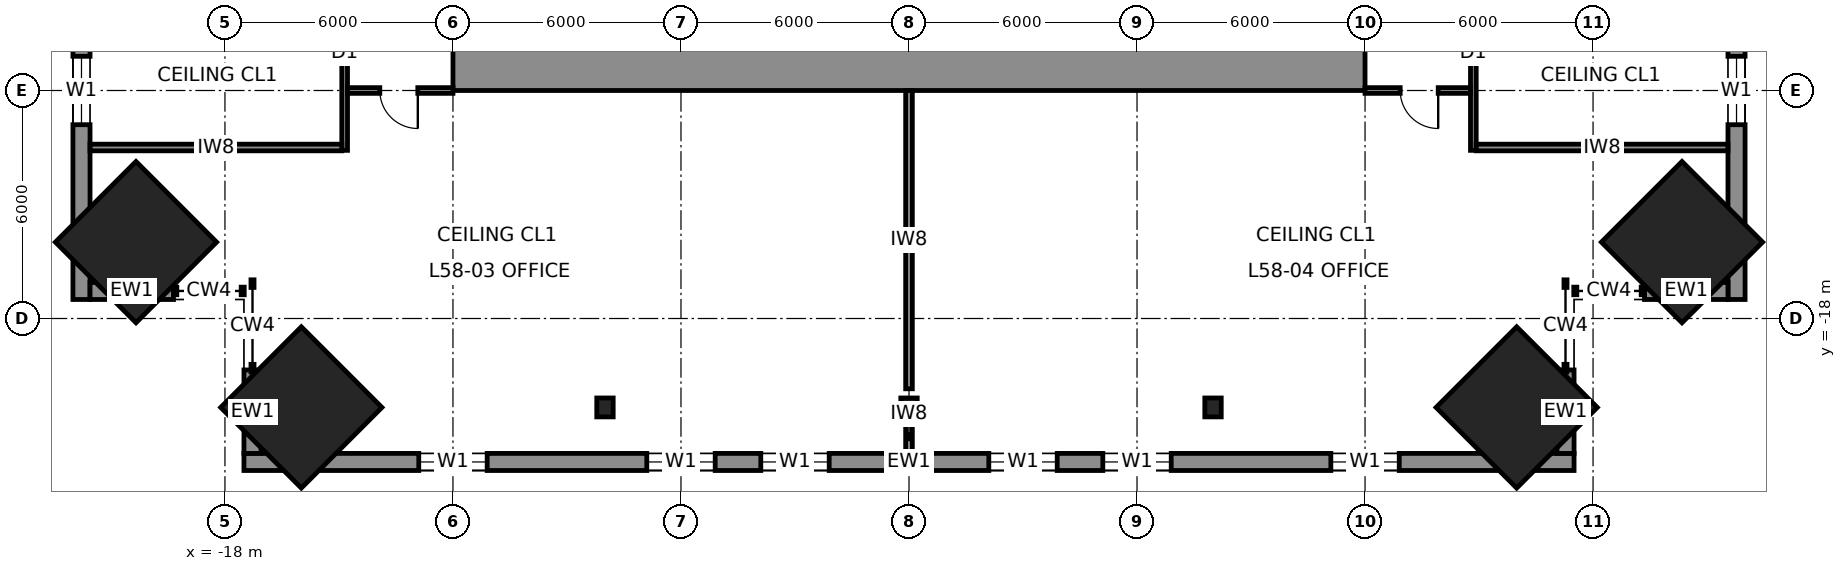
"""IFC4 building model, lengths in metres.
Left out: names, types, materials, properties, quantities, classifications, styles, units other than length and angle.
Written with IfcOpenShell. Run it as: python <this file> out.ifc"""

import sys

from ifc_helpers import new_model, si_unit, direction, frame, frame_2d, origin, origin_2d, place, context, subcontext, project, spatial, rectangle, i_section, extrude, element, fill, save


model = new_model("IFC4")
c1 = context("Model", 3, precision=1e-05, world=origin(), true_north=direction((0.0, 1.0)))
c2 = subcontext(c1, "Body", "Model", "MODEL_VIEW")
j1 = project(units=[si_unit("LENGTHUNIT", "METRE"), si_unit("PLANEANGLEUNIT", "RADIAN")], contexts=[c1])
p1 = place(None, origin())
s1 = spatial("IfcSite", under=j1, at=p1, CompositionType="ELEMENT")
p2 = place(p1, origin())
s2 = spatial("IfcBuilding", under=s1, at=p2, CompositionType="ELEMENT")
p3 = place(p2, frame((0.0, 0.0, 261.8)))
s3 = spatial("IfcBuildingStorey", under=s2, at=p3, CompositionType="ELEMENT", Elevation=261.8)
for number, where, z_axis, x_axis in (
    (1, (20.34, -15.99, 0.0), (-0.04, 0.04, 0.998), (-0.707, -0.708, 0.0)),
    (2, (15.99, -20.34, 0.0), (-0.04, 0.04, 0.998), (-0.708, -0.707, 0.0)),
    (3, (-15.99, -20.34, 0.0), (0.04, 0.04, 0.998), (-0.708, 0.707, 0.0)),
    (4, (-20.34, -15.99, 0.0), (0.04, 0.04, 0.998), (-0.707, 0.708, 0.0)),
):
    element("IfcColumn", number, at=place(p3, frame(where, z_axis=z_axis, x_axis=x_axis)), inside=s3, PredefinedType="COLUMN", context=c2, shape_type="SweptSolid", body=[
        extrude(rectangle(XDim=3.0, YDim=3.0, at=origin_2d()), origin(), (0.0, 0.0, 1.0), 4.007),
    ])
for number, where, z_axis, x_axis in (
    (5, (0.0, -20.34, 0.0), (0.0, 0.04, 0.999), (-1.0, 0.0, 0.0)),
    (6, (-8.0, -20.34, 0.0), (0.0, 0.04, 0.999), (-1.0, 0.0, 0.0)),
    (7, (8.0, -20.34, 0.0), (0.0, 0.04, 0.999), (-1.0, 0.0, 0.0)),
):
    element("IfcColumn", number, at=place(p3, frame(where, z_axis=z_axis, x_axis=x_axis)), inside=s3, PredefinedType="COLUMN", context=c2, shape_type="SweptSolid", body=[
        extrude(i_section(OverallWidth=0.432, OverallDepth=0.498, WebThickness=0.056, FlangeThickness=0.089, at=origin_2d()), origin(), (0.0, 0.0, 1.0), 4.003),
    ])
p4 = place(p3, frame((12.0, -11.25, 0.0), z_axis=(0.0, 0.0, 1.0), x_axis=(-1.0, 0.0, 0.0)))
e8 = element("IfcWall", 8, at=p4, inside=s3, PredefinedType="SHEAR", context=c2, shape_type="SweptSolid", body=[
    extrude(rectangle(XDim=24.0, YDim=1.5, at=frame_2d((12.0, 0.0))), origin(), (0.0, 0.0, 1.0), 4.0),
])
p5 = place(p3, frame((21.775, -17.5, 0.0), z_axis=(0.0, 0.0, 1.0), x_axis=(0.0, 1.0, 0.0)))
e9 = element("IfcWall", 9, at=p5, inside=s3, PredefinedType="SOLIDWALL", context=c2, shape_type="SweptSolid", body=[
    extrude(rectangle(XDim=35.0, YDim=0.45, at=frame_2d((17.5, 0.0))), origin(), (0.0, 0.0, 1.0), 3.83),
])
p6 = place(p5, frame((4.6, 0.0, 0.7)))
e10 = element("IfcOpeningElement", 10, at=p6, cuts=e9, PredefinedType="OPENING", context=c2, shape_type="SweptSolid", body=[
    extrude(rectangle(XDim=1.8, YDim=2.6, at=frame_2d((0.9, 1.3))), frame((0.0, 0.235, 0.0), z_axis=(0.0, -1.0, 0.0), x_axis=(1.0, 0.0, 0.0)), (0.0, 0.0, 1.0), 0.47),
])
p7 = place(p5, frame((10.6, 0.0, 0.7)))
e11 = element("IfcOpeningElement", 11, at=p7, cuts=e9, PredefinedType="OPENING", context=c2, shape_type="SweptSolid", body=[
    extrude(rectangle(XDim=1.8, YDim=2.6, at=frame_2d((0.9, 1.3))), frame((0.0, 0.235, 0.0), z_axis=(0.0, -1.0, 0.0), x_axis=(1.0, 0.0, 0.0)), (0.0, 0.0, 1.0), 0.47),
])
p8 = place(p5, frame((13.6, 0.0, 0.7)))
e12 = element("IfcOpeningElement", 12, at=p8, cuts=e9, PredefinedType="OPENING", context=c2, shape_type="SweptSolid", body=[
    extrude(rectangle(XDim=1.8, YDim=2.6, at=frame_2d((0.9, 1.3))), frame((0.0, 0.235, 0.0), z_axis=(0.0, -1.0, 0.0), x_axis=(1.0, 0.0, 0.0)), (0.0, 0.0, 1.0), 0.47),
])
p9 = place(p5, frame((19.6, 0.0, 0.7)))
e13 = element("IfcOpeningElement", 13, at=p9, cuts=e9, PredefinedType="OPENING", context=c2, shape_type="SweptSolid", body=[
    extrude(rectangle(XDim=1.8, YDim=2.6, at=frame_2d((0.9, 1.3))), frame((0.0, 0.235, 0.0), z_axis=(0.0, -1.0, 0.0), x_axis=(1.0, 0.0, 0.0)), (0.0, 0.0, 1.0), 0.47),
])
p10 = place(p5, frame((22.6, 0.0, 0.7)))
e14 = element("IfcOpeningElement", 14, at=p10, cuts=e9, PredefinedType="OPENING", context=c2, shape_type="SweptSolid", body=[
    extrude(rectangle(XDim=1.8, YDim=2.6, at=frame_2d((0.9, 1.3))), frame((0.0, 0.235, 0.0), z_axis=(0.0, -1.0, 0.0), x_axis=(1.0, 0.0, 0.0)), (0.0, 0.0, 1.0), 0.47),
])
p11 = place(p5, frame((28.6, 0.0, 0.7)))
e15 = element("IfcOpeningElement", 15, at=p11, cuts=e9, PredefinedType="OPENING", context=c2, shape_type="SweptSolid", body=[
    extrude(rectangle(XDim=1.8, YDim=2.6, at=frame_2d((0.9, 1.3))), frame((0.0, 0.235, 0.0), z_axis=(0.0, -1.0, 0.0), x_axis=(1.0, 0.0, 0.0)), (0.0, 0.0, 1.0), 0.47),
])
p12 = place(p3, frame((-17.5, -21.775, 0.0), z_axis=(0.0, 0.0, 1.0), x_axis=(1.0, 0.0, 0.0)))
e16 = element("IfcWall", 16, at=p12, inside=s3, PredefinedType="SOLIDWALL", context=c2, shape_type="SweptSolid", body=[
    extrude(rectangle(XDim=35.0, YDim=0.45, at=frame_2d((17.5, 0.0))), origin(), (0.0, 0.0, 1.0), 3.83),
])
p13 = place(p12, frame((4.6, 0.0, 0.7)))
e17 = element("IfcOpeningElement", 17, at=p13, cuts=e16, PredefinedType="OPENING", context=c2, shape_type="SweptSolid", body=[
    extrude(rectangle(XDim=1.8, YDim=2.6, at=frame_2d((0.9, 1.3))), frame((0.0, 0.235, 0.0), z_axis=(0.0, -1.0, 0.0), x_axis=(1.0, 0.0, 0.0)), (0.0, 0.0, 1.0), 0.47),
])
p14 = place(p12, frame((10.6, 0.0, 0.7)))
e18 = element("IfcOpeningElement", 18, at=p14, cuts=e16, PredefinedType="OPENING", context=c2, shape_type="SweptSolid", body=[
    extrude(rectangle(XDim=1.8, YDim=2.6, at=frame_2d((0.9, 1.3))), frame((0.0, 0.235, 0.0), z_axis=(0.0, -1.0, 0.0), x_axis=(1.0, 0.0, 0.0)), (0.0, 0.0, 1.0), 0.47),
])
p15 = place(p12, frame((13.6, 0.0, 0.7)))
e19 = element("IfcOpeningElement", 19, at=p15, cuts=e16, PredefinedType="OPENING", context=c2, shape_type="SweptSolid", body=[
    extrude(rectangle(XDim=1.8, YDim=2.6, at=frame_2d((0.9, 1.3))), frame((0.0, 0.235, 0.0), z_axis=(0.0, -1.0, 0.0), x_axis=(1.0, 0.0, 0.0)), (0.0, 0.0, 1.0), 0.47),
])
p16 = place(p12, frame((19.6, 0.0, 0.7)))
e20 = element("IfcOpeningElement", 20, at=p16, cuts=e16, PredefinedType="OPENING", context=c2, shape_type="SweptSolid", body=[
    extrude(rectangle(XDim=1.8, YDim=2.6, at=frame_2d((0.9, 1.3))), frame((0.0, 0.235, 0.0), z_axis=(0.0, -1.0, 0.0), x_axis=(1.0, 0.0, 0.0)), (0.0, 0.0, 1.0), 0.47),
])
p17 = place(p12, frame((22.6, 0.0, 0.7)))
e21 = element("IfcOpeningElement", 21, at=p17, cuts=e16, PredefinedType="OPENING", context=c2, shape_type="SweptSolid", body=[
    extrude(rectangle(XDim=1.8, YDim=2.6, at=frame_2d((0.9, 1.3))), frame((0.0, 0.235, 0.0), z_axis=(0.0, -1.0, 0.0), x_axis=(1.0, 0.0, 0.0)), (0.0, 0.0, 1.0), 0.47),
])
p18 = place(p12, frame((28.6, 0.0, 0.7)))
e22 = element("IfcOpeningElement", 22, at=p18, cuts=e16, PredefinedType="OPENING", context=c2, shape_type="SweptSolid", body=[
    extrude(rectangle(XDim=1.8, YDim=2.6, at=frame_2d((0.9, 1.3))), frame((0.0, 0.235, 0.0), z_axis=(0.0, -1.0, 0.0), x_axis=(1.0, 0.0, 0.0)), (0.0, 0.0, 1.0), 0.47),
])
p19 = place(p3, frame((-21.775, 17.5, 0.0), z_axis=(0.0, 0.0, 1.0), x_axis=(0.0, -1.0, 0.0)))
e23 = element("IfcWall", 23, at=p19, inside=s3, PredefinedType="SOLIDWALL", context=c2, shape_type="SweptSolid", body=[
    extrude(rectangle(XDim=35.0, YDim=0.45, at=frame_2d((17.5, 0.0))), origin(), (0.0, 0.0, 1.0), 3.83),
])
p20 = place(p19, frame((4.6, 0.0, 0.7)))
e24 = element("IfcOpeningElement", 24, at=p20, cuts=e23, PredefinedType="OPENING", context=c2, shape_type="SweptSolid", body=[
    extrude(rectangle(XDim=1.8, YDim=2.6, at=frame_2d((0.9, 1.3))), frame((0.0, 0.235, 0.0), z_axis=(0.0, -1.0, 0.0), x_axis=(1.0, 0.0, 0.0)), (0.0, 0.0, 1.0), 0.47),
])
p21 = place(p19, frame((10.6, 0.0, 0.7)))
e25 = element("IfcOpeningElement", 25, at=p21, cuts=e23, PredefinedType="OPENING", context=c2, shape_type="SweptSolid", body=[
    extrude(rectangle(XDim=1.8, YDim=2.6, at=frame_2d((0.9, 1.3))), frame((0.0, 0.235, 0.0), z_axis=(0.0, -1.0, 0.0), x_axis=(1.0, 0.0, 0.0)), (0.0, 0.0, 1.0), 0.47),
])
p22 = place(p19, frame((13.6, 0.0, 0.7)))
e26 = element("IfcOpeningElement", 26, at=p22, cuts=e23, PredefinedType="OPENING", context=c2, shape_type="SweptSolid", body=[
    extrude(rectangle(XDim=1.8, YDim=2.6, at=frame_2d((0.9, 1.3))), frame((0.0, 0.235, 0.0), z_axis=(0.0, -1.0, 0.0), x_axis=(1.0, 0.0, 0.0)), (0.0, 0.0, 1.0), 0.47),
])
p23 = place(p19, frame((19.6, 0.0, 0.7)))
e27 = element("IfcOpeningElement", 27, at=p23, cuts=e23, PredefinedType="OPENING", context=c2, shape_type="SweptSolid", body=[
    extrude(rectangle(XDim=1.8, YDim=2.6, at=frame_2d((0.9, 1.3))), frame((0.0, 0.235, 0.0), z_axis=(0.0, -1.0, 0.0), x_axis=(1.0, 0.0, 0.0)), (0.0, 0.0, 1.0), 0.47),
])
p24 = place(p19, frame((22.6, 0.0, 0.7)))
e28 = element("IfcOpeningElement", 28, at=p24, cuts=e23, PredefinedType="OPENING", context=c2, shape_type="SweptSolid", body=[
    extrude(rectangle(XDim=1.8, YDim=2.6, at=frame_2d((0.9, 1.3))), frame((0.0, 0.235, 0.0), z_axis=(0.0, -1.0, 0.0), x_axis=(1.0, 0.0, 0.0)), (0.0, 0.0, 1.0), 0.47),
])
p25 = place(p19, frame((28.6, 0.0, 0.7)))
e29 = element("IfcOpeningElement", 29, at=p25, cuts=e23, PredefinedType="OPENING", context=c2, shape_type="SweptSolid", body=[
    extrude(rectangle(XDim=1.8, YDim=2.6, at=frame_2d((0.9, 1.3))), frame((0.0, 0.235, 0.0), z_axis=(0.0, -1.0, 0.0), x_axis=(1.0, 0.0, 0.0)), (0.0, 0.0, 1.0), 0.47),
])
for number, where, z_axis, x_axis in (
    (30, (17.275, -19.354, 0.0), (0.0, 0.0, 1.0), (0.0, -1.0, 0.0)),
    (31, (19.354, -17.275, 0.0), (0.0, 0.0, 1.0), (1.0, 0.0, 0.0)),
    (32, (-17.275, -19.354, 0.0), (0.0, 0.0, 1.0), (0.0, -1.0, 0.0)),
    (33, (-19.354, -17.275, 0.0), (0.0, 0.0, 1.0), (-1.0, 0.0, 0.0)),
):
    element("IfcWall", number, at=place(p3, frame(where, z_axis=z_axis, x_axis=x_axis)), inside=s3, PredefinedType="SOLIDWALL", context=c2, shape_type="SweptSolid", body=[
        extrude(rectangle(XDim=2.196, YDim=0.45, at=frame_2d((1.098, 0.0))), origin(), (0.0, 0.0, 1.0), 3.83),
    ])
p26 = place(p3, frame((14.85, -13.575, 0.0), z_axis=(0.0, 0.0, 1.0), x_axis=(0.0, 1.0, 0.0)))
e34 = element("IfcWall", 34, at=p26, inside=s3, PredefinedType="PARTITIONING", context=c2, shape_type="SweptSolid", body=[
    extrude(rectangle(XDim=27.15, YDim=0.15, at=frame_2d((13.575, 0.0))), origin(), (0.0, 0.0, 1.0), 3.83),
])
p27 = place(p26, frame((3.175, 0.0, 0.0)))
e35 = element("IfcOpeningElement", 35, at=p27, cuts=e34, PredefinedType="OPENING", context=c2, shape_type="SweptSolid", body=[
    extrude(rectangle(XDim=1.0, YDim=2.3, at=frame_2d((0.5, 1.15))), frame((0.0, 0.085, 0.0), z_axis=(0.0, -1.0, 0.0), x_axis=(1.0, 0.0, 0.0)), (0.0, 0.0, 1.0), 0.17),
])
p28 = place(p26, frame((6.625, 0.0, 0.0)))
e36 = element("IfcOpeningElement", 36, at=p28, cuts=e34, PredefinedType="OPENING", context=c2, shape_type="SweptSolid", body=[
    extrude(rectangle(XDim=1.0, YDim=2.3, at=frame_2d((0.5, 1.15))), frame((0.0, 0.085, 0.0), z_axis=(0.0, -1.0, 0.0), x_axis=(1.0, 0.0, 0.0)), (0.0, 0.0, 1.0), 0.17),
])
p29 = place(p26, frame((19.775, 0.0, 0.0)))
e37 = element("IfcOpeningElement", 37, at=p29, cuts=e34, PredefinedType="OPENING", context=c2, shape_type="SweptSolid", body=[
    extrude(rectangle(XDim=1.0, YDim=2.3, at=frame_2d((0.5, 1.15))), frame((0.0, 0.085, 0.0), z_axis=(0.0, -1.0, 0.0), x_axis=(1.0, 0.0, 0.0)), (0.0, 0.0, 1.0), 0.17),
])
p30 = place(p26, frame((22.975, 0.0, 0.0)))
e38 = element("IfcOpeningElement", 38, at=p30, cuts=e34, PredefinedType="OPENING", context=c2, shape_type="SweptSolid", body=[
    extrude(rectangle(XDim=1.0, YDim=2.3, at=frame_2d((0.5, 1.15))), frame((0.0, 0.085, 0.0), z_axis=(0.0, -1.0, 0.0), x_axis=(1.0, 0.0, 0.0)), (0.0, 0.0, 1.0), 0.17),
])
p31 = place(p26, frame((16.825, 0.0, 0.0)))
e39 = element("IfcOpeningElement", 39, at=p31, cuts=e34, PredefinedType="OPENING", context=c2, shape_type="SweptSolid", body=[
    extrude(rectangle(XDim=1.0, YDim=2.3, at=frame_2d((0.5, 1.15))), frame((0.0, 0.085, 0.0), z_axis=(0.0, -1.0, 0.0), x_axis=(1.0, 0.0, 0.0)), (0.0, 0.0, 1.0), 0.17),
])
p32 = place(p26, frame((9.575, 0.0, 0.0)))
e40 = element("IfcOpeningElement", 40, at=p32, cuts=e34, PredefinedType="OPENING", context=c2, shape_type="SweptSolid", body=[
    extrude(rectangle(XDim=1.0, YDim=2.3, at=frame_2d((0.5, 1.15))), frame((0.0, 0.085, 0.0), z_axis=(0.0, -1.0, 0.0), x_axis=(1.0, 0.0, 0.0)), (0.0, 0.0, 1.0), 0.17),
])
p33 = place(p3, frame((-14.85, 13.575, 0.0), z_axis=(0.0, 0.0, 1.0), x_axis=(0.0, -1.0, 0.0)))
e41 = element("IfcWall", 41, at=p33, inside=s3, PredefinedType="PARTITIONING", context=c2, shape_type="SweptSolid", body=[
    extrude(rectangle(XDim=27.15, YDim=0.15, at=frame_2d((13.575, 0.0))), origin(), (0.0, 0.0, 1.0), 3.83),
])
p34 = place(p33, frame((22.975, 0.0, 0.0)))
e42 = element("IfcOpeningElement", 42, at=p34, cuts=e41, PredefinedType="OPENING", context=c2, shape_type="SweptSolid", body=[
    extrude(rectangle(XDim=1.0, YDim=2.3, at=frame_2d((0.5, 1.15))), frame((0.0, 0.085, 0.0), z_axis=(0.0, -1.0, 0.0), x_axis=(1.0, 0.0, 0.0)), (0.0, 0.0, 1.0), 0.17),
])
p35 = place(p33, frame((19.525, 0.0, 0.0)))
e43 = element("IfcOpeningElement", 43, at=p35, cuts=e41, PredefinedType="OPENING", context=c2, shape_type="SweptSolid", body=[
    extrude(rectangle(XDim=1.0, YDim=2.3, at=frame_2d((0.5, 1.15))), frame((0.0, 0.085, 0.0), z_axis=(0.0, -1.0, 0.0), x_axis=(1.0, 0.0, 0.0)), (0.0, 0.0, 1.0), 0.17),
])
p36 = place(p33, frame((6.375, 0.0, 0.0)))
e44 = element("IfcOpeningElement", 44, at=p36, cuts=e41, PredefinedType="OPENING", context=c2, shape_type="SweptSolid", body=[
    extrude(rectangle(XDim=1.0, YDim=2.3, at=frame_2d((0.5, 1.15))), frame((0.0, 0.085, 0.0), z_axis=(0.0, -1.0, 0.0), x_axis=(1.0, 0.0, 0.0)), (0.0, 0.0, 1.0), 0.17),
])
p37 = place(p33, frame((3.175, 0.0, 0.0)))
e45 = element("IfcOpeningElement", 45, at=p37, cuts=e41, PredefinedType="OPENING", context=c2, shape_type="SweptSolid", body=[
    extrude(rectangle(XDim=1.0, YDim=2.3, at=frame_2d((0.5, 1.15))), frame((0.0, 0.085, 0.0), z_axis=(0.0, -1.0, 0.0), x_axis=(1.0, 0.0, 0.0)), (0.0, 0.0, 1.0), 0.17),
])
p38 = place(p33, frame((9.575, 0.0, 0.0)))
e46 = element("IfcOpeningElement", 46, at=p38, cuts=e41, PredefinedType="OPENING", context=c2, shape_type="SweptSolid", body=[
    extrude(rectangle(XDim=1.0, YDim=2.3, at=frame_2d((0.5, 1.15))), frame((0.0, 0.085, 0.0), z_axis=(0.0, -1.0, 0.0), x_axis=(1.0, 0.0, 0.0)), (0.0, 0.0, 1.0), 0.17),
])
p39 = place(p33, frame((16.575, 0.0, 0.0)))
e47 = element("IfcOpeningElement", 47, at=p39, cuts=e41, PredefinedType="OPENING", context=c2, shape_type="SweptSolid", body=[
    extrude(rectangle(XDim=1.0, YDim=2.3, at=frame_2d((0.5, 1.15))), frame((0.0, 0.085, 0.0), z_axis=(0.0, -1.0, 0.0), x_axis=(1.0, 0.0, 0.0)), (0.0, 0.0, 1.0), 0.17),
])
p40 = place(p3, frame((14.775, -12.0, 0.0), z_axis=(0.0, 0.0, 1.0), x_axis=(-1.0, 0.0, 0.0)))
e48 = element("IfcWall", 48, at=p40, inside=s3, PredefinedType="PARTITIONING", context=c2, shape_type="SweptSolid", body=[
    extrude(rectangle(XDim=2.775, YDim=0.15, at=frame_2d((1.387, 0.0))), origin(), (0.0, 0.0, 1.0), 3.83),
])
p41 = place(p40, frame((0.85, 0.0, 0.0)))
e49 = element("IfcOpeningElement", 49, at=p41, cuts=e48, PredefinedType="OPENING", context=c2, shape_type="SweptSolid", body=[
    extrude(rectangle(XDim=1.0, YDim=2.3, at=frame_2d((0.5, 1.15))), frame((0.0, 0.085, 0.0), z_axis=(0.0, -1.0, 0.0), x_axis=(1.0, 0.0, 0.0)), (0.0, 0.0, 1.0), 0.17),
])
p42 = place(p3, frame((-12.0, -12.0, 0.0), z_axis=(0.0, 0.0, 1.0), x_axis=(-1.0, 0.0, 0.0)))
e50 = element("IfcWall", 50, at=p42, inside=s3, PredefinedType="PARTITIONING", context=c2, shape_type="SweptSolid", body=[
    extrude(rectangle(XDim=2.775, YDim=0.15, at=frame_2d((1.387, 0.0))), origin(), (0.0, 0.0, 1.0), 3.83),
])
p43 = place(p42, frame((0.925, 0.0, 0.0)))
e51 = element("IfcOpeningElement", 51, at=p43, cuts=e50, PredefinedType="OPENING", context=c2, shape_type="SweptSolid", body=[
    extrude(rectangle(XDim=1.0, YDim=2.3, at=frame_2d((0.5, 1.15))), frame((0.0, 0.085, 0.0), z_axis=(0.0, -1.0, 0.0), x_axis=(1.0, 0.0, 0.0)), (0.0, 0.0, 1.0), 0.17),
])
for number, where, z_axis, x_axis in (
    (52, (21.55, -13.5, 0.0), (0.0, 0.0, 1.0), (-1.0, 0.0, 0.0)),
    (53, (-14.925, -13.5, 0.0), (0.0, 0.0, 1.0), (-1.0, 0.0, 0.0)),
):
    element("IfcWall", number, at=place(p3, frame(where, z_axis=z_axis, x_axis=x_axis)), inside=s3, PredefinedType="PARTITIONING", context=c2, shape_type="SweptSolid", body=[
        extrude(rectangle(XDim=6.625, YDim=0.175, at=frame_2d((3.312, 0.0))), origin(), (0.0, 0.0, 1.0), 3.83),
    ])
p44 = place(p3, frame((0.0, -12.0, 0.0), z_axis=(0.0, 0.0, 1.0), x_axis=(0.0, -1.0, 0.0)))
e54 = element("IfcWall", 54, at=p44, inside=s3, PredefinedType="PARTITIONING", context=c2, shape_type="SweptSolid", body=[
    extrude(rectangle(XDim=7.849, YDim=0.175, at=frame_2d((3.925, 0.0))), origin(), (0.0, 0.0, 1.0), 3.14),
])
p45 = place(p3, frame((0.0, -20.67, 0.0), z_axis=(0.0, 0.0, 1.0), x_axis=(0.0, -1.0, 0.0)))
e55 = element("IfcWall", 55, at=p45, inside=s3, PredefinedType="PARTITIONING", context=c2, shape_type="SweptSolid", body=[
    extrude(rectangle(XDim=0.88, YDim=0.175, at=frame_2d((0.44, 0.0))), origin(), (0.0, 0.0, 1.0), 3.83),
])
p46 = place(p6, origin())
e56 = element("IfcWindow", 56, at=p46, inside=s3, PartitioningType="SINGLE_PANEL", PredefinedType="WINDOW", context=c2, shape_type="SweptSolid", body=[
    extrude(rectangle(XDim=1.8, YDim=2.6, at=frame_2d((0.9, 1.3))), frame((0.0, 0.03, 0.0), z_axis=(0.0, -1.0, 0.0), x_axis=(1.0, 0.0, 0.0)), (0.0, 0.0, 1.0), 0.06),
])
fill(e10, e56)
p47 = place(p13, origin())
e57 = element("IfcWindow", 57, at=p47, inside=s3, PartitioningType="SINGLE_PANEL", PredefinedType="WINDOW", context=c2, shape_type="SweptSolid", body=[
    extrude(rectangle(XDim=1.8, YDim=2.6, at=frame_2d((0.9, 1.3))), frame((0.0, 0.03, 0.0), z_axis=(0.0, -1.0, 0.0), x_axis=(1.0, 0.0, 0.0)), (0.0, 0.0, 1.0), 0.06),
])
fill(e17, e57)
p48 = place(p14, origin())
e58 = element("IfcWindow", 58, at=p48, inside=s3, PartitioningType="SINGLE_PANEL", PredefinedType="WINDOW", context=c2, shape_type="SweptSolid", body=[
    extrude(rectangle(XDim=1.8, YDim=2.6, at=frame_2d((0.9, 1.3))), frame((0.0, 0.03, 0.0), z_axis=(0.0, -1.0, 0.0), x_axis=(1.0, 0.0, 0.0)), (0.0, 0.0, 1.0), 0.06),
])
fill(e18, e58)
p49 = place(p15, origin())
e59 = element("IfcWindow", 59, at=p49, inside=s3, PartitioningType="SINGLE_PANEL", PredefinedType="WINDOW", context=c2, shape_type="SweptSolid", body=[
    extrude(rectangle(XDim=1.8, YDim=2.6, at=frame_2d((0.9, 1.3))), frame((0.0, 0.03, 0.0), z_axis=(0.0, -1.0, 0.0), x_axis=(1.0, 0.0, 0.0)), (0.0, 0.0, 1.0), 0.06),
])
fill(e19, e59)
p50 = place(p16, origin())
e60 = element("IfcWindow", 60, at=p50, inside=s3, PartitioningType="SINGLE_PANEL", PredefinedType="WINDOW", context=c2, shape_type="SweptSolid", body=[
    extrude(rectangle(XDim=1.8, YDim=2.6, at=frame_2d((0.9, 1.3))), frame((0.0, 0.03, 0.0), z_axis=(0.0, -1.0, 0.0), x_axis=(1.0, 0.0, 0.0)), (0.0, 0.0, 1.0), 0.06),
])
fill(e20, e60)
p51 = place(p17, origin())
e61 = element("IfcWindow", 61, at=p51, inside=s3, PartitioningType="SINGLE_PANEL", PredefinedType="WINDOW", context=c2, shape_type="SweptSolid", body=[
    extrude(rectangle(XDim=1.8, YDim=2.6, at=frame_2d((0.9, 1.3))), frame((0.0, 0.03, 0.0), z_axis=(0.0, -1.0, 0.0), x_axis=(1.0, 0.0, 0.0)), (0.0, 0.0, 1.0), 0.06),
])
fill(e21, e61)
p52 = place(p18, origin())
e62 = element("IfcWindow", 62, at=p52, inside=s3, PartitioningType="SINGLE_PANEL", PredefinedType="WINDOW", context=c2, shape_type="SweptSolid", body=[
    extrude(rectangle(XDim=1.8, YDim=2.6, at=frame_2d((0.9, 1.3))), frame((0.0, 0.03, 0.0), z_axis=(0.0, -1.0, 0.0), x_axis=(1.0, 0.0, 0.0)), (0.0, 0.0, 1.0), 0.06),
])
fill(e22, e62)
p53 = place(p25, origin())
e63 = element("IfcWindow", 63, at=p53, inside=s3, PartitioningType="SINGLE_PANEL", PredefinedType="WINDOW", context=c2, shape_type="SweptSolid", body=[
    extrude(rectangle(XDim=1.8, YDim=2.6, at=frame_2d((0.9, 1.3))), frame((0.0, 0.03, 0.0), z_axis=(0.0, -1.0, 0.0), x_axis=(1.0, 0.0, 0.0)), (0.0, 0.0, 1.0), 0.06),
])
fill(e29, e63)
p54 = place(p43, origin())
e64 = element("IfcDoor", 64, at=p54, inside=s3, OperationType="SINGLE_SWING_LEFT", PredefinedType="DOOR", context=c2, shape_type="SweptSolid", body=[
    extrude(rectangle(XDim=1.0, YDim=2.3, at=frame_2d((0.5, 1.15))), frame((0.0, 0.025, 0.0), z_axis=(0.0, -1.0, 0.0), x_axis=(1.0, 0.0, 0.0)), (0.0, 0.0, 1.0), 0.05),
])
fill(e51, e64)
p55 = place(p41, origin())
e65 = element("IfcDoor", 65, at=p55, inside=s3, OperationType="SINGLE_SWING_LEFT", PredefinedType="DOOR", context=c2, shape_type="SweptSolid", body=[
    extrude(rectangle(XDim=1.0, YDim=2.3, at=frame_2d((0.5, 1.15))), frame((0.0, 0.025, 0.0), z_axis=(0.0, -1.0, 0.0), x_axis=(1.0, 0.0, 0.0)), (0.0, 0.0, 1.0), 0.05),
])
fill(e49, e65)
save(model, sys.argv[1])
